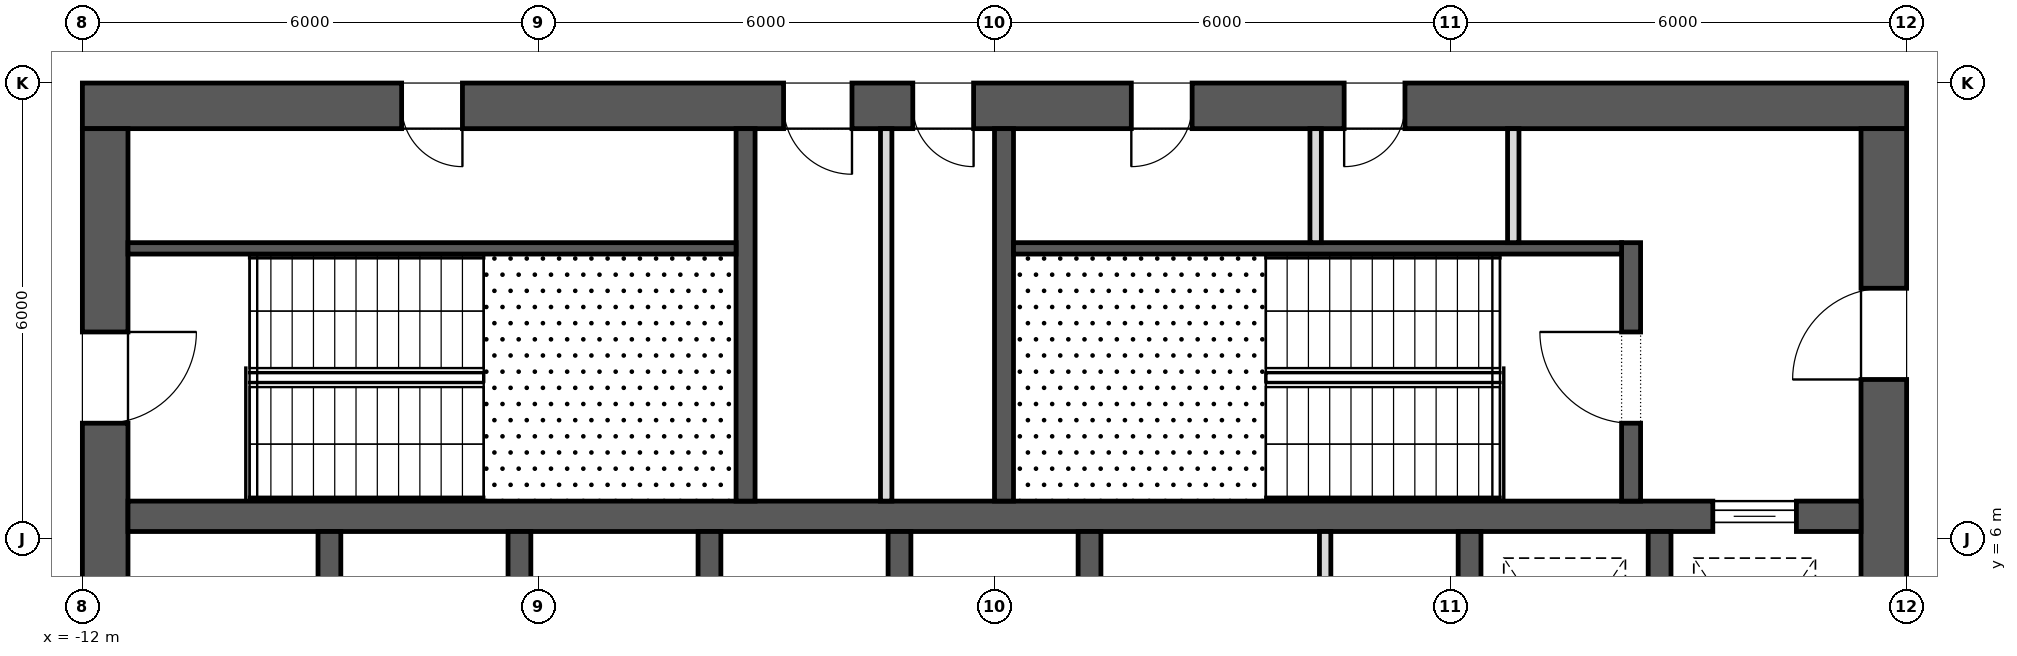
"""IFC4 building model, lengths in metres.
Left out: names, types, materials, properties, quantities, classifications, styles, units other than length and angle.
Written with IfcOpenShell. Run it as: python <this file> out.ifc"""

import sys

from ifc_helpers import new_model, si_unit, direction, frame, frame_2d, origin, place, context, subcontext, project, spatial, rectangle, extrude, element, fill, save


model = new_model("IFC4")
c1 = context("Model", 3, precision=1e-05, world=origin(), true_north=direction((0.0, 1.0)))
c2 = subcontext(c1, "Body", "Model", "MODEL_VIEW")
j1 = project(units=[si_unit("LENGTHUNIT", "METRE"), si_unit("PLANEANGLEUNIT", "RADIAN")], contexts=[c1])
p1 = place(None, origin())
s1 = spatial("IfcSite", under=j1, at=p1, CompositionType="ELEMENT")
p2 = place(p1, origin())
s2 = spatial("IfcBuilding", under=s1, at=p2, CompositionType="ELEMENT")
p3 = place(p2, frame((0.0, 0.0, 202.9)))
s3 = spatial("IfcBuildingStorey", under=s2, at=p3, CompositionType="ELEMENT", Elevation=202.9)
p4 = place(p3, frame((-12.0, 11.7, 0.0), z_axis=(0.0, 0.0, 1.0), x_axis=(1.0, 0.0, 0.0)))
e1 = element("IfcWall", 1, at=p4, inside=s3, PredefinedType="SHEAR", context=c2, shape_type="SweptSolid", body=[
    extrude(rectangle(XDim=24.0, YDim=0.6, at=frame_2d((12.0, 0.0))), origin(), (0.0, 0.0, 1.0), 4.0),
])
p5 = place(p4, frame((9.225, 0.0, 0.0)))
e2 = element("IfcOpeningElement", 2, at=p5, cuts=e1, PredefinedType="OPENING", context=c2, shape_type="SweptSolid", body=[
    extrude(rectangle(XDim=0.9, YDim=2.1, at=frame_2d((0.45, 1.05))), frame((0.0, 0.312, 0.0), z_axis=(0.0, -1.0, 0.0), x_axis=(1.0, 0.0, 0.0)), (0.0, 0.0, 1.0), 0.624),
])
p6 = place(p4, frame((10.925, 0.0, 0.0)))
e3 = element("IfcOpeningElement", 3, at=p6, cuts=e1, PredefinedType="OPENING", context=c2, shape_type="SweptSolid", body=[
    extrude(rectangle(XDim=0.8, YDim=2.1, at=frame_2d((0.4, 1.05))), frame((0.0, 0.312, 0.0), z_axis=(0.0, -1.0, 0.0), x_axis=(1.0, 0.0, 0.0)), (0.0, 0.0, 1.0), 0.624),
])
p7 = place(p4, frame((4.2, 0.0, 0.0)))
e4 = element("IfcOpeningElement", 4, at=p7, cuts=e1, PredefinedType="OPENING", context=c2, shape_type="SweptSolid", body=[
    extrude(rectangle(XDim=0.8, YDim=2.1, at=frame_2d((0.4, 1.05))), frame((0.0, 0.312, 0.0), z_axis=(0.0, -1.0, 0.0), x_axis=(1.0, 0.0, 0.0)), (0.0, 0.0, 1.0), 0.624),
])
p8 = place(p4, frame((13.8, 0.0, 0.0)))
e5 = element("IfcOpeningElement", 5, at=p8, cuts=e1, PredefinedType="OPENING", context=c2, shape_type="SweptSolid", body=[
    extrude(rectangle(XDim=0.8, YDim=2.1, at=frame_2d((0.4, 1.05))), frame((0.0, 0.312, 0.0), z_axis=(0.0, -1.0, 0.0), x_axis=(1.0, 0.0, 0.0)), (0.0, 0.0, 1.0), 0.624),
])
p9 = place(p4, frame((16.6, 0.0, 0.0)))
e6 = element("IfcOpeningElement", 6, at=p9, cuts=e1, PredefinedType="OPENING", context=c2, shape_type="SweptSolid", body=[
    extrude(rectangle(XDim=0.8, YDim=2.1, at=frame_2d((0.4, 1.05))), frame((0.0, 0.312, 0.0), z_axis=(0.0, -1.0, 0.0), x_axis=(1.0, 0.0, 0.0)), (0.0, 0.0, 1.0), 0.624),
])
p10 = place(p3, frame((11.7, -11.4, 0.0), z_axis=(0.0, 0.0, 1.0), x_axis=(0.0, 1.0, 0.0)))
e7 = element("IfcWall", 7, at=p10, inside=s3, PredefinedType="SHEAR", context=c2, shape_type="SweptSolid", body=[
    extrude(rectangle(XDim=22.8, YDim=0.6, at=frame_2d((11.4, 0.0))), origin(), (0.0, 0.0, 1.0), 4.0),
])
p11 = place(p10, frame((10.2, 0.0, 0.0)))
e8 = element("IfcOpeningElement", 8, at=p11, cuts=e7, PredefinedType="OPENING", context=c2, shape_type="SweptSolid", body=[
    extrude(rectangle(XDim=2.4, YDim=2.1, at=frame_2d((1.2, 1.05))), frame((0.0, 0.312, 0.0), z_axis=(0.0, -1.0, 0.0), x_axis=(1.0, 0.0, 0.0)), (0.0, 0.0, 1.0), 0.624),
])
p12 = place(p10, frame((19.5, 0.0, 0.0)))
e9 = element("IfcOpeningElement", 9, at=p12, cuts=e7, PredefinedType="OPENING", context=c2, shape_type="SweptSolid", body=[
    extrude(rectangle(XDim=1.2, YDim=2.1, at=frame_2d((0.6, 1.05))), frame((0.0, 0.312, 0.0), z_axis=(0.0, -1.0, 0.0), x_axis=(1.0, 0.0, 0.0)), (0.0, 0.0, 1.0), 0.624),
])
p13 = place(p10, frame((2.1, 0.0, 0.0)))
e10 = element("IfcOpeningElement", 10, at=p13, cuts=e7, PredefinedType="OPENING", context=c2, shape_type="SweptSolid", body=[
    extrude(rectangle(XDim=1.2, YDim=2.1, at=frame_2d((0.6, 1.05))), frame((0.0, 0.312, 0.0), z_axis=(0.0, -1.0, 0.0), x_axis=(1.0, 0.0, 0.0)), (0.0, 0.0, 1.0), 0.624),
])
p14 = place(p3, frame((-11.7, -11.4, 0.0), z_axis=(0.0, 0.0, 1.0), x_axis=(0.0, 1.0, 0.0)))
e11 = element("IfcWall", 11, at=p14, inside=s3, PredefinedType="SHEAR", context=c2, shape_type="SweptSolid", body=[
    extrude(rectangle(XDim=22.8, YDim=0.6, at=frame_2d((11.4, 0.0))), origin(), (0.0, 0.0, 1.0), 4.0),
])
p15 = place(p14, frame((10.2, 0.0, 0.0)))
e12 = element("IfcOpeningElement", 12, at=p15, cuts=e11, PredefinedType="OPENING", context=c2, shape_type="SweptSolid", body=[
    extrude(rectangle(XDim=2.4, YDim=2.1, at=frame_2d((1.2, 1.05))), frame((0.0, 0.312, 0.0), z_axis=(0.0, -1.0, 0.0), x_axis=(1.0, 0.0, 0.0)), (0.0, 0.0, 1.0), 0.624),
])
p16 = place(p14, frame((18.925, 0.0, 0.0)))
e13 = element("IfcOpeningElement", 13, at=p16, cuts=e11, PredefinedType="OPENING", context=c2, shape_type="SweptSolid", body=[
    extrude(rectangle(XDim=1.2, YDim=2.1, at=frame_2d((0.6, 1.05))), frame((0.0, 0.312, 0.0), z_axis=(0.0, -1.0, 0.0), x_axis=(1.0, 0.0, 0.0)), (0.0, 0.0, 1.0), 0.624),
])
p17 = place(p14, frame((2.675, 0.0, 0.0)))
e14 = element("IfcOpeningElement", 14, at=p17, cuts=e11, PredefinedType="OPENING", context=c2, shape_type="SweptSolid", body=[
    extrude(rectangle(XDim=1.2, YDim=2.1, at=frame_2d((0.6, 1.05))), frame((0.0, 0.312, 0.0), z_axis=(0.0, -1.0, 0.0), x_axis=(1.0, 0.0, 0.0)), (0.0, 0.0, 1.0), 0.624),
])
p18 = place(p3, frame((-11.4, 6.3, 0.0), z_axis=(0.0, 0.0, 1.0), x_axis=(1.0, 0.0, 0.0)))
e15 = element("IfcWall", 15, at=p18, inside=s3, PredefinedType="SHEAR", context=c2, shape_type="SweptSolid", body=[
    extrude(rectangle(XDim=22.8, YDim=0.4, at=frame_2d((11.4, 0.0))), origin(), (0.0, 0.0, 1.0), 4.0),
])
p19 = place(p18, frame((20.85, 0.0, 0.0)))
e16 = element("IfcOpeningElement", 16, at=p19, cuts=e15, PredefinedType="OPENING", context=c2, shape_type="SweptSolid", body=[
    extrude(rectangle(XDim=1.1, YDim=2.1, at=frame_2d((0.55, 1.05))), frame((0.0, 0.212, 0.0), z_axis=(0.0, -1.0, 0.0), x_axis=(1.0, 0.0, 0.0)), (0.0, 0.0, 1.0), 0.424),
])
for number, where, z_axis, x_axis in (
    (17, (-8.75, 3.2, 0.0), (0.0, 0.0, 1.0), (0.0, 1.0, 0.0)),
    (18, (-6.25, 3.2, 0.0), (0.0, 0.0, 1.0), (0.0, 1.0, 0.0)),
    (19, (-3.75, 3.2, 0.0), (0.0, 0.0, 1.0), (0.0, 1.0, 0.0)),
    (20, (-1.25, 3.2, 0.0), (0.0, 0.0, 1.0), (0.0, 1.0, 0.0)),
    (21, (1.25, 3.2, 0.0), (0.0, 0.0, 1.0), (0.0, 1.0, 0.0)),
    (22, (6.25, 3.2, 0.0), (0.0, 0.0, 1.0), (0.0, 1.0, 0.0)),
    (23, (8.75, 3.2, 0.0), (0.0, 0.0, 1.0), (0.0, 1.0, 0.0)),
):
    element("IfcWall", number, at=place(p3, frame(where, z_axis=z_axis, x_axis=x_axis)), inside=s3, PredefinedType="SHEAR", context=c2, shape_type="SweptSolid", body=[
        extrude(rectangle(XDim=2.9, YDim=0.3, at=frame_2d((1.45, 0.0))), origin(), (0.0, 0.0, 1.0), 4.0),
    ])
for number, where, z_axis, x_axis in (
    (24, (-3.275, 6.5, 0.0), (0.0, 0.0, 1.0), (0.0, 1.0, 0.0)),
    (25, (0.125, 6.5, 0.0), (0.0, 0.0, 1.0), (0.0, 1.0, 0.0)),
):
    element("IfcWall", number, at=place(p3, frame(where, z_axis=z_axis, x_axis=x_axis)), inside=s3, PredefinedType="SHEAR", context=c2, shape_type="SweptSolid", body=[
        extrude(rectangle(XDim=4.9, YDim=0.25, at=frame_2d((2.45, 0.0))), origin(), (0.0, 0.0, 1.0), 3.7),
    ])
p20 = place(p3, frame((8.375, 6.5, 0.0), z_axis=(0.0, 0.0, 1.0), x_axis=(0.0, 1.0, 0.0)))
e26 = element("IfcWall", 26, at=p20, inside=s3, PredefinedType="SHEAR", context=c2, shape_type="SweptSolid", body=[
    extrude(rectangle(XDim=3.4, YDim=0.25, at=frame_2d((1.7, 0.0))), origin(), (0.0, 0.0, 1.0), 3.7),
])
p21 = place(p20, frame((1.025, 0.0, 0.0)))
e27 = element("IfcOpeningElement", 27, at=p21, cuts=e26, PredefinedType="OPENING", context=c2, shape_type="SweptSolid", body=[
    extrude(rectangle(XDim=1.2, YDim=2.1, at=frame_2d((0.6, 1.05))), frame((0.0, 0.137, 0.0), z_axis=(0.0, -1.0, 0.0), x_axis=(1.0, 0.0, 0.0)), (0.0, 0.0, 1.0), 0.274),
])
for number, where, z_axis, x_axis in (
    (28, (-11.4, 9.825, 0.0), (0.0, 0.0, 1.0), (1.0, 0.0, 0.0)),
    (29, (0.25, 9.825, 0.0), (0.0, 0.0, 1.0), (1.0, 0.0, 0.0)),
):
    element("IfcWall", number, at=place(p3, frame(where, z_axis=z_axis, x_axis=x_axis)), inside=s3, PredefinedType="SHEAR", context=c2, shape_type="SweptSolid", body=[
        extrude(rectangle(XDim=8.0, YDim=0.15, at=frame_2d((4.0, 0.0))), origin(), (0.0, 0.0, 1.0), 3.7),
    ])
p22 = place(p3, frame((-1.425, 6.5, 0.0), z_axis=(0.0, 0.0, 1.0), x_axis=(0.0, 1.0, 0.0)))
e30 = element("IfcWall", 30, at=p22, inside=s3, PredefinedType="PARTITIONING", context=c2, shape_type="SweptSolid", body=[
    extrude(rectangle(XDim=4.9, YDim=0.15, at=frame_2d((2.45, 0.0))), origin(), (0.0, 0.0, 1.0), 3.7),
])
for number, where, z_axis, x_axis in (
    (31, (4.225, 9.9, 0.0), (0.0, 0.0, 1.0), (0.0, 1.0, 0.0)),
    (32, (6.825, 9.9, 0.0), (0.0, 0.0, 1.0), (0.0, 1.0, 0.0)),
):
    element("IfcWall", number, at=place(p3, frame(where, z_axis=z_axis, x_axis=x_axis)), inside=s3, PredefinedType="PARTITIONING", context=c2, shape_type="SweptSolid", body=[
        extrude(rectangle(XDim=1.5, YDim=0.15, at=frame_2d((0.75, 0.0))), origin(), (0.0, 0.0, 1.0), 3.7),
    ])
p23 = place(p3, frame((4.35, 3.2, 0.0), z_axis=(0.0, 0.0, 1.0), x_axis=(0.0, 1.0, 0.0)))
e33 = element("IfcWall", 33, at=p23, inside=s3, PredefinedType="PARTITIONING", context=c2, shape_type="SweptSolid", body=[
    extrude(rectangle(XDim=2.9, YDim=0.15, at=frame_2d((1.45, 0.0))), origin(), (0.0, 0.0, 1.0), 3.7),
])
p24 = place(p19, origin())
e34 = element("IfcDoor", 34, at=p24, inside=s3, OperationType="SLIDING_TO_LEFT", PredefinedType="DOOR", context=c2, shape_type="SweptSolid", body=[
    extrude(rectangle(XDim=1.1, YDim=2.1, at=frame_2d((0.55, 1.05))), frame((0.0, 0.025, 0.0), z_axis=(0.0, -1.0, 0.0), x_axis=(1.0, 0.0, 0.0)), (0.0, 0.0, 1.0), 0.05),
])
fill(e16, e34)
p25 = place(p16, frame((1.2, 0.0, 0.0), z_axis=(0.0, 0.0, 1.0), x_axis=(-1.0, 0.0, 0.0)))
e35 = element("IfcDoor", 35, at=p25, inside=s3, OperationType="SINGLE_SWING_RIGHT", PredefinedType="DOOR", context=c2, shape_type="SweptSolid", body=[
    extrude(rectangle(XDim=1.2, YDim=2.1, at=frame_2d((0.6, 1.05))), frame((0.0, 0.025, 0.0), z_axis=(0.0, -1.0, 0.0), x_axis=(1.0, 0.0, 0.0)), (0.0, 0.0, 1.0), 0.05),
])
fill(e13, e35)
p26 = place(p21, origin())
e36 = element("IfcDoor", 36, at=p26, inside=s3, OperationType="SINGLE_SWING_LEFT", PredefinedType="DOOR", context=c2, shape_type="SweptSolid", body=[
    extrude(rectangle(XDim=1.2, YDim=2.1, at=frame_2d((0.6, 1.05))), frame((0.0, 0.025, 0.0), z_axis=(0.0, -1.0, 0.0), x_axis=(1.0, 0.0, 0.0)), (0.0, 0.0, 1.0), 0.05),
])
fill(e27, e36)
p27 = place(p12, origin())
e37 = element("IfcDoor", 37, at=p27, inside=s3, OperationType="SINGLE_SWING_RIGHT", PredefinedType="DOOR", context=c2, shape_type="SweptSolid", body=[
    extrude(rectangle(XDim=1.2, YDim=2.1, at=frame_2d((0.6, 1.05))), frame((0.0, 0.025, 0.0), z_axis=(0.0, -1.0, 0.0), x_axis=(1.0, 0.0, 0.0)), (0.0, 0.0, 1.0), 0.05),
])
fill(e9, e37)
p28 = place(p5, frame((0.9, 0.0, 0.0), z_axis=(0.0, 0.0, 1.0), x_axis=(-1.0, 0.0, 0.0)))
e38 = element("IfcDoor", 38, at=p28, inside=s3, OperationType="SINGLE_SWING_RIGHT", PredefinedType="DOOR", context=c2, shape_type="SweptSolid", body=[
    extrude(rectangle(XDim=0.9, YDim=2.1, at=frame_2d((0.45, 1.05))), frame((0.0, 0.025, 0.0), z_axis=(0.0, -1.0, 0.0), x_axis=(1.0, 0.0, 0.0)), (0.0, 0.0, 1.0), 0.05),
])
fill(e2, e38)
p29 = place(p6, frame((0.8, 0.0, 0.0), z_axis=(0.0, 0.0, 1.0), x_axis=(-1.0, 0.0, 0.0)))
e39 = element("IfcDoor", 39, at=p29, inside=s3, OperationType="SINGLE_SWING_RIGHT", PredefinedType="DOOR", context=c2, shape_type="SweptSolid", body=[
    extrude(rectangle(XDim=0.8, YDim=2.1, at=frame_2d((0.4, 1.05))), frame((0.0, 0.025, 0.0), z_axis=(0.0, -1.0, 0.0), x_axis=(1.0, 0.0, 0.0)), (0.0, 0.0, 1.0), 0.05),
])
fill(e3, e39)
p30 = place(p7, frame((0.8, 0.0, 0.0), z_axis=(0.0, 0.0, 1.0), x_axis=(-1.0, 0.0, 0.0)))
e40 = element("IfcDoor", 40, at=p30, inside=s3, OperationType="SINGLE_SWING_RIGHT", PredefinedType="DOOR", context=c2, shape_type="SweptSolid", body=[
    extrude(rectangle(XDim=0.8, YDim=2.1, at=frame_2d((0.4, 1.05))), frame((0.0, 0.025, 0.0), z_axis=(0.0, -1.0, 0.0), x_axis=(1.0, 0.0, 0.0)), (0.0, 0.0, 1.0), 0.05),
])
fill(e4, e40)
p31 = place(p8, frame((0.8, 0.0, 0.0), z_axis=(0.0, 0.0, 1.0), x_axis=(-1.0, 0.0, 0.0)))
e41 = element("IfcDoor", 41, at=p31, inside=s3, OperationType="SINGLE_SWING_LEFT", PredefinedType="DOOR", context=c2, shape_type="SweptSolid", body=[
    extrude(rectangle(XDim=0.8, YDim=2.1, at=frame_2d((0.4, 1.05))), frame((0.0, 0.025, 0.0), z_axis=(0.0, -1.0, 0.0), x_axis=(1.0, 0.0, 0.0)), (0.0, 0.0, 1.0), 0.05),
])
fill(e5, e41)
p32 = place(p9, frame((0.8, 0.0, 0.0), z_axis=(0.0, 0.0, 1.0), x_axis=(-1.0, 0.0, 0.0)))
e42 = element("IfcDoor", 42, at=p32, inside=s3, OperationType="SINGLE_SWING_LEFT", PredefinedType="DOOR", context=c2, shape_type="SweptSolid", body=[
    extrude(rectangle(XDim=0.8, YDim=2.1, at=frame_2d((0.4, 1.05))), frame((0.0, 0.025, 0.0), z_axis=(0.0, -1.0, 0.0), x_axis=(1.0, 0.0, 0.0)), (0.0, 0.0, 1.0), 0.05),
])
fill(e6, e42)
save(model, sys.argv[1])
